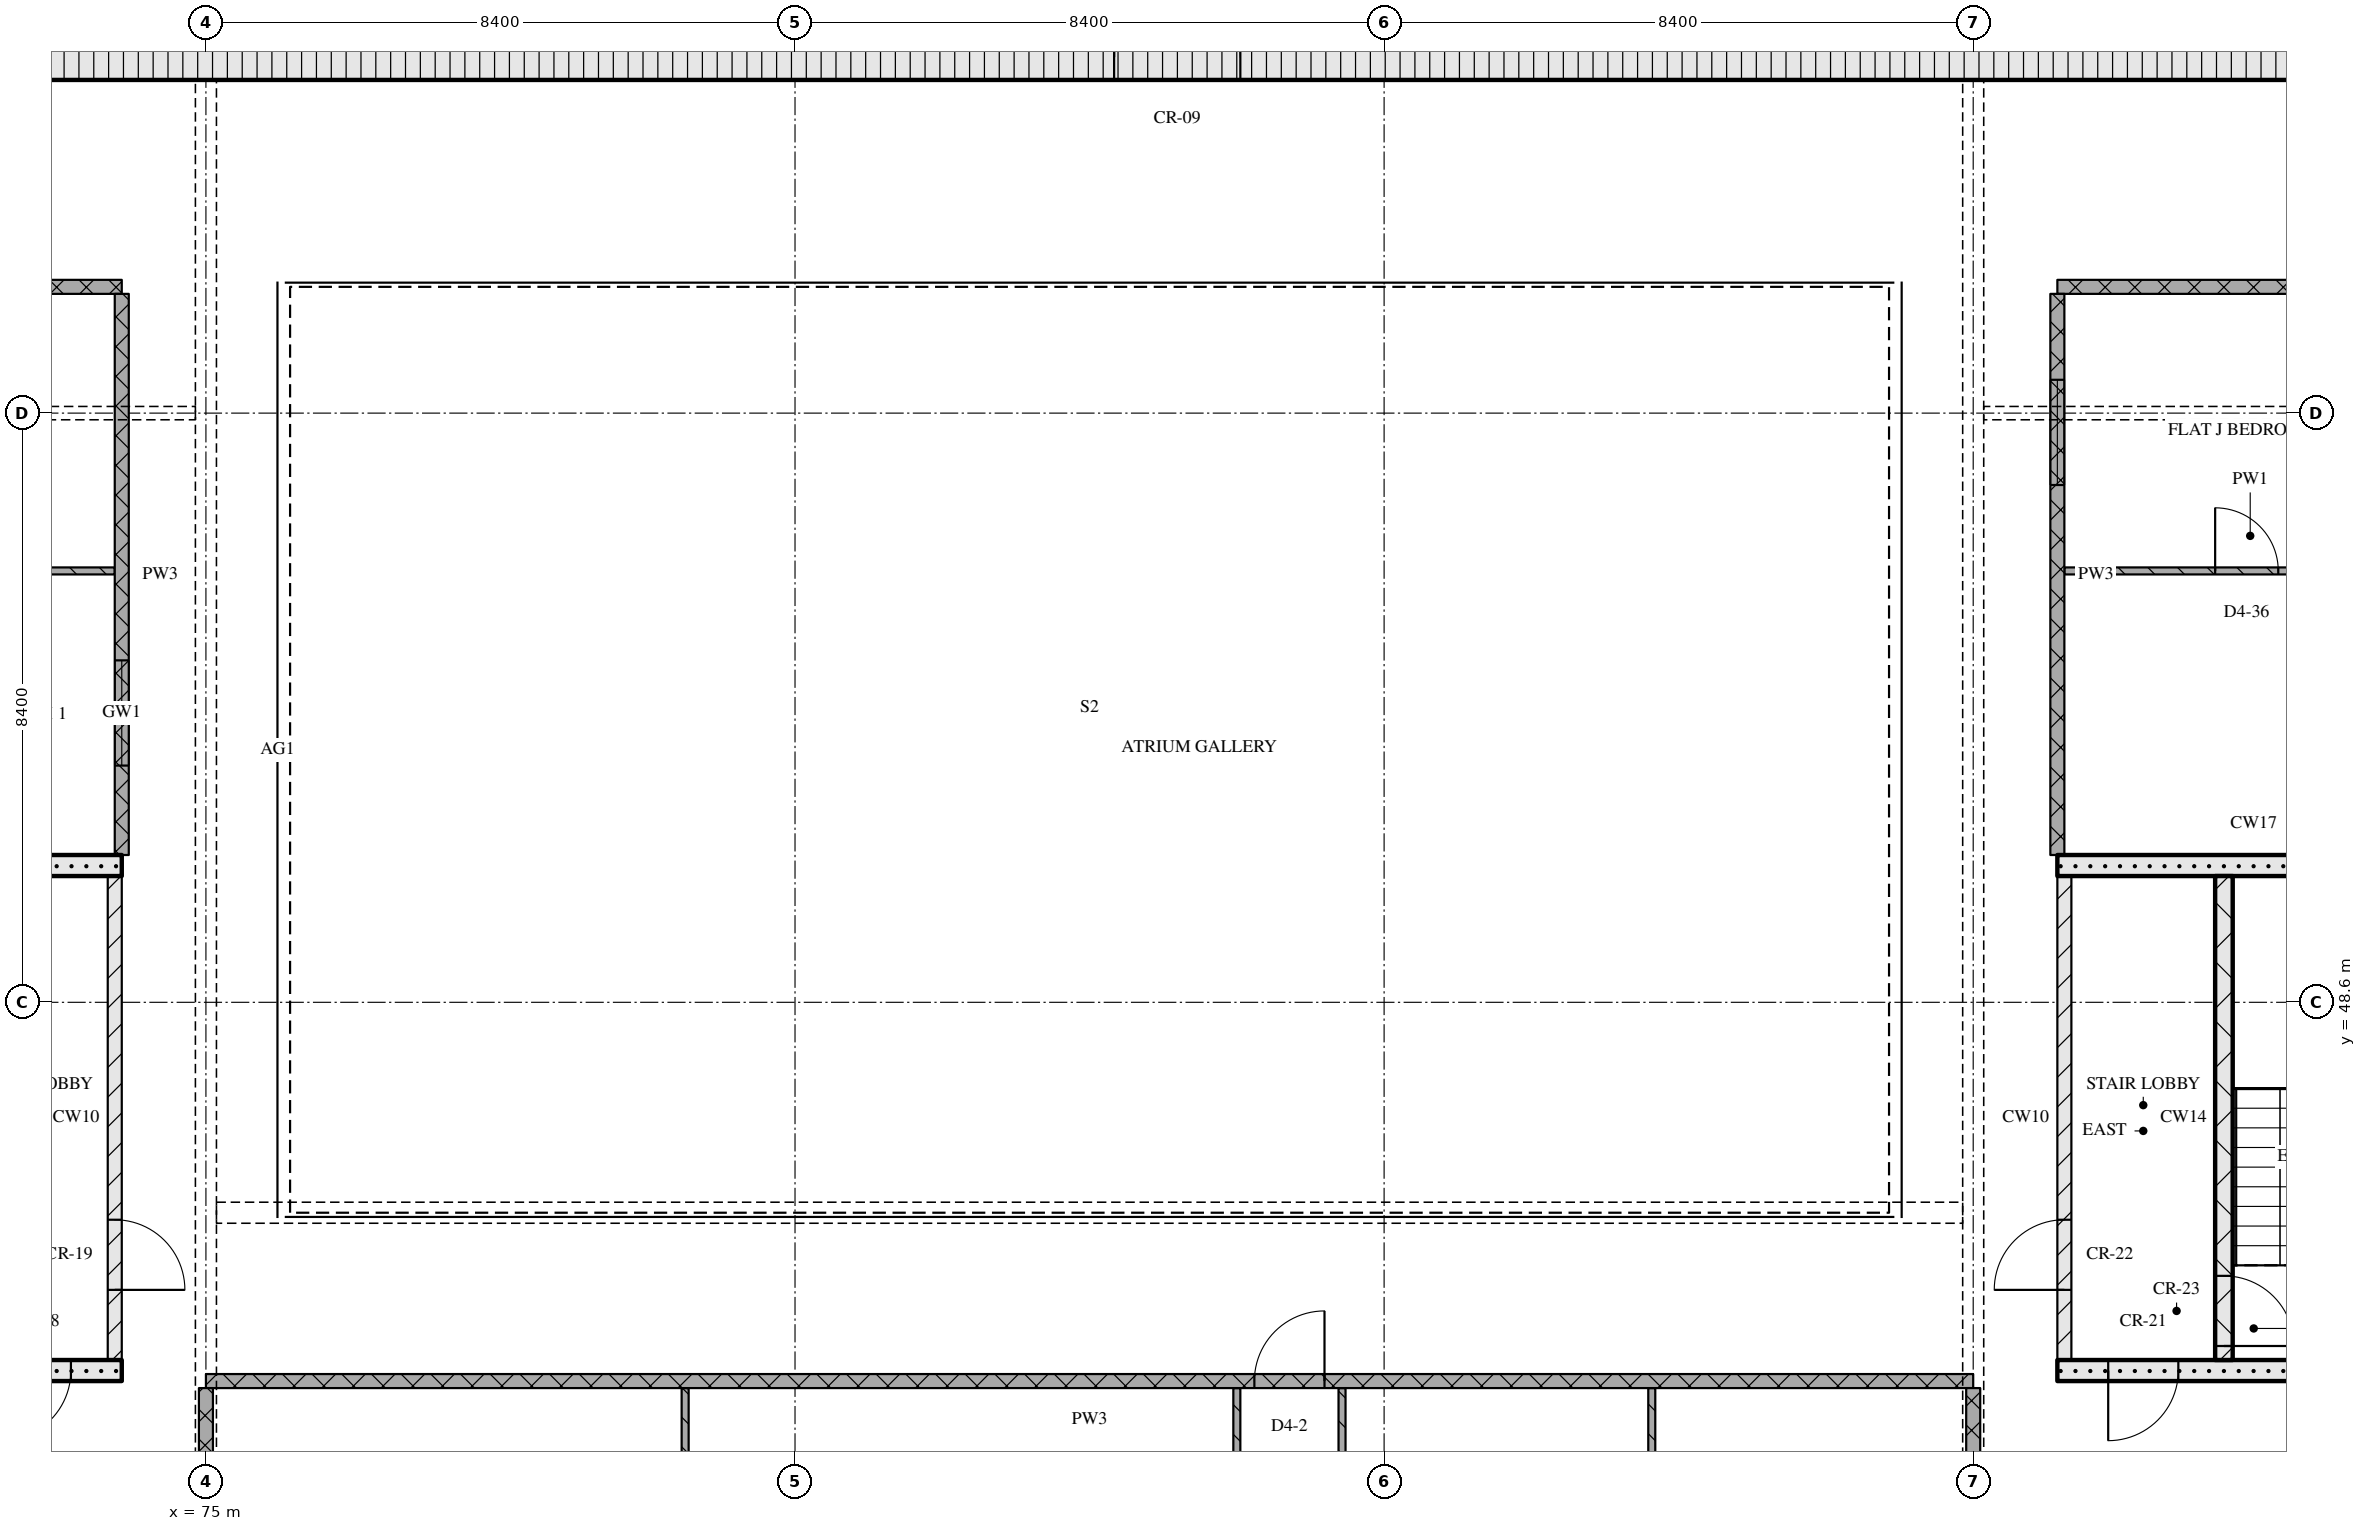
"""IFC4 building model, lengths in metres.
Left out: names, types, materials, properties, quantities, classifications, styles, units other than length and angle.
Written with IfcOpenShell. Run it as: python <this file> out.ifc"""

import sys

from ifc_helpers import new_model, si_unit, direction, frame, frame_2d, origin, place, context, subcontext, project, spatial, rectangle, extrude, element, fill, save


model = new_model("IFC4")
c1 = context("Model", 3, precision=1e-05, world=origin(), true_north=direction((0.0, 1.0)))
c2 = subcontext(c1, "Body", "Model", "MODEL_VIEW")
j1 = project(units=[si_unit("LENGTHUNIT", "METRE"), si_unit("PLANEANGLEUNIT", "RADIAN")], contexts=[c1])
p1 = place(None, origin())
s1 = spatial("IfcSite", under=j1, at=p1, CompositionType="ELEMENT")
p2 = place(p1, origin())
s2 = spatial("IfcBuilding", under=s1, at=p2, CompositionType="ELEMENT")
p3 = place(p2, frame((0.0, 0.0, 237.9)))
s3 = spatial("IfcBuildingStorey", under=s2, at=p3, CompositionType="ELEMENT", Elevation=237.9)
p4 = place(p3, frame((67.15, 62.075, 0.0), z_axis=(0.0, 0.0, 1.0), x_axis=(1.0, 0.0, 0.0)))
e1 = element("IfcWall", 1, at=p4, inside=s3, PredefinedType="SOLIDWALL", context=c2, shape_type="SweptSolid", body=[
    extrude(rectangle(XDim=40.9, YDim=0.65, at=frame_2d((20.45, 0.0))), origin(), (0.0, 0.0, 1.0), 3.32),
])
p5 = place(p4, frame((20.8, 0.0, 0.0)))
e2 = element("IfcOpeningElement", 2, at=p5, cuts=e1, PredefinedType="OPENING", context=c2, shape_type="SweptSolid", body=[
    extrude(rectangle(XDim=1.8, YDim=2.1, at=frame_2d((0.9, 1.05))), frame((0.0, 0.335, 0.0), z_axis=(0.0, -1.0, 0.0), x_axis=(1.0, 0.0, 0.0)), (0.0, 0.0, 1.0), 0.67),
])
p6 = place(p3, frame((68.2, 43.35, 0.0), z_axis=(0.0, 0.0, 1.0), x_axis=(1.0, 0.0, 0.0)))
e3 = element("IfcWall", 3, at=p6, inside=s3, PredefinedType="SOLIDWALL", context=c2, shape_type="SweptSolid", body=[
    extrude(rectangle(XDim=5.6, YDim=0.3, at=frame_2d((2.8, 0.0))), origin(), (0.0, 0.0, 1.0), 3.32),
])
p7 = place(p6, frame((3.875, 0.0, 0.0)))
e4 = element("IfcOpeningElement", 4, at=p7, cuts=e3, PredefinedType="OPENING", context=c2, shape_type="SweptSolid", body=[
    extrude(rectangle(XDim=1.0, YDim=2.1, at=frame_2d((0.5, 1.05))), frame((0.0, 0.16, 0.0), z_axis=(0.0, -1.0, 0.0), x_axis=(1.0, 0.0, 0.0)), (0.0, 0.0, 1.0), 0.32),
])
p8 = place(p3, frame((73.7, 43.5, 0.0), z_axis=(0.0, 0.0, 1.0), x_axis=(0.0, 1.0, 0.0)))
e5 = element("IfcWall", 5, at=p8, inside=s3, PredefinedType="PARTITIONING", context=c2, shape_type="SweptSolid", body=[
    extrude(rectangle(XDim=6.9, YDim=0.2, at=frame_2d((3.45, 0.0))), origin(), (0.0, 0.0, 1.0), 3.32),
])
p9 = place(p8, frame((1.0, 0.0, 0.0)))
e6 = element("IfcOpeningElement", 6, at=p9, cuts=e5, PredefinedType="OPENING", context=c2, shape_type="SweptSolid", body=[
    extrude(rectangle(XDim=1.0, YDim=2.1, at=frame_2d((0.5, 1.05))), frame((0.0, 0.11, 0.0), z_axis=(0.0, -1.0, 0.0), x_axis=(1.0, 0.0, 0.0)), (0.0, 0.0, 1.0), 0.22),
])
p10 = place(p3, frame((68.2, 50.55, 0.0), z_axis=(0.0, 0.0, 1.0), x_axis=(1.0, 0.0, 0.0)))
e7 = element("IfcWall", 7, at=p10, inside=s3, PredefinedType="SOLIDWALL", context=c2, shape_type="SweptSolid", body=[
    extrude(rectangle(XDim=5.6, YDim=0.3, at=frame_2d((2.8, 0.0))), origin(), (0.0, 0.0, 1.0), 3.32),
])
p11 = place(p3, frame((101.4, 43.35, 0.0), z_axis=(0.0, 0.0, 1.0), x_axis=(1.0, 0.0, 0.0)))
e8 = element("IfcWall", 8, at=p11, inside=s3, PredefinedType="SOLIDWALL", context=c2, shape_type="SweptSolid", body=[
    extrude(rectangle(XDim=5.6, YDim=0.3, at=frame_2d((2.8, 0.0))), origin(), (0.0, 0.0, 1.0), 3.32),
])
p12 = place(p11, frame((0.725, 0.0, 0.0)))
e9 = element("IfcOpeningElement", 9, at=p12, cuts=e8, PredefinedType="OPENING", context=c2, shape_type="SweptSolid", body=[
    extrude(rectangle(XDim=1.0, YDim=2.1, at=frame_2d((0.5, 1.05))), frame((0.0, 0.16, 0.0), z_axis=(0.0, -1.0, 0.0), x_axis=(1.0, 0.0, 0.0)), (0.0, 0.0, 1.0), 0.32),
])
p13 = place(p3, frame((101.5, 43.5, 0.0), z_axis=(0.0, 0.0, 1.0), x_axis=(0.0, 1.0, 0.0)))
e10 = element("IfcWall", 10, at=p13, inside=s3, PredefinedType="PARTITIONING", context=c2, shape_type="SweptSolid", body=[
    extrude(rectangle(XDim=6.9, YDim=0.2, at=frame_2d((3.45, 0.0))), origin(), (0.0, 0.0, 1.0), 3.32),
])
p14 = place(p13, frame((1.0, 0.0, 0.0)))
e11 = element("IfcOpeningElement", 11, at=p14, cuts=e10, PredefinedType="OPENING", context=c2, shape_type="SweptSolid", body=[
    extrude(rectangle(XDim=1.0, YDim=2.1, at=frame_2d((0.5, 1.05))), frame((0.0, 0.11, 0.0), z_axis=(0.0, -1.0, 0.0), x_axis=(1.0, 0.0, 0.0)), (0.0, 0.0, 1.0), 0.22),
])
p15 = place(p3, frame((103.775, 43.5, 0.0), z_axis=(0.0, 0.0, 1.0), x_axis=(0.0, 1.0, 0.0)))
e12 = element("IfcWall", 12, at=p15, inside=s3, PredefinedType="SOLIDWALL", context=c2, shape_type="SweptSolid", body=[
    extrude(rectangle(XDim=6.9, YDim=0.25, at=frame_2d((3.45, 0.0))), origin(), (0.0, 0.0, 1.0), 3.32),
])
p16 = place(p15, frame((0.2, 0.0, 0.0)))
e13 = element("IfcOpeningElement", 13, at=p16, cuts=e12, PredefinedType="OPENING", context=c2, shape_type="SweptSolid", body=[
    extrude(rectangle(XDim=1.0, YDim=2.1, at=frame_2d((0.5, 1.05))), frame((0.0, 0.135, 0.0), z_axis=(0.0, -1.0, 0.0), x_axis=(1.0, 0.0, 0.0)), (0.0, 0.0, 1.0), 0.27),
])
p17 = place(p3, frame((101.4, 50.55, 0.0), z_axis=(0.0, 0.0, 1.0), x_axis=(1.0, 0.0, 0.0)))
e14 = element("IfcWall", 14, at=p17, inside=s3, PredefinedType="SOLIDWALL", context=c2, shape_type="SweptSolid", body=[
    extrude(rectangle(XDim=5.6, YDim=0.3, at=frame_2d((2.8, 0.0))), origin(), (0.0, 0.0, 1.0), 3.32),
])
p18 = place(p3, frame((100.2, 43.2, 0.0), z_axis=(0.0, 0.0, 1.0), x_axis=(-1.0, 0.0, 0.0)))
e15 = element("IfcWall", 15, at=p18, inside=s3, PredefinedType="PARTITIONING", context=c2, shape_type="SweptSolid", body=[
    extrude(rectangle(XDim=25.2, YDim=0.2, at=frame_2d((12.6, 0.0))), origin(), (0.0, 0.0, 1.0), 3.32),
])
p19 = place(p18, frame((9.25, 0.0, 0.0)))
e16 = element("IfcOpeningElement", 16, at=p19, cuts=e15, PredefinedType="OPENING", context=c2, shape_type="SweptSolid", body=[
    extrude(rectangle(XDim=1.0, YDim=2.1, at=frame_2d((0.5, 1.05))), frame((0.0, 0.11, 0.0), z_axis=(0.0, -1.0, 0.0), x_axis=(1.0, 0.0, 0.0)), (0.0, 0.0, 1.0), 0.22),
])
p20 = place(p3, frame((73.7, 54.75, 0.0), z_axis=(0.0, 0.0, 1.0), x_axis=(-1.0, 0.0, 0.0)))
e17 = element("IfcWall", 17, at=p20, inside=s3, PredefinedType="PARTITIONING", context=c2, shape_type="SweptSolid", body=[
    extrude(rectangle(XDim=4.4, YDim=0.1, at=frame_2d((2.2, 0.0))), origin(), (0.0, 0.0, 1.0), 3.32),
])
p21 = place(p20, frame((1.7, 0.0, 0.0)))
e18 = element("IfcOpeningElement", 18, at=p21, cuts=e17, PredefinedType="OPENING", context=c2, shape_type="SweptSolid", body=[
    extrude(rectangle(XDim=0.9, YDim=2.1, at=frame_2d((0.45, 1.05))), frame((0.0, 0.06, 0.0), z_axis=(0.0, -1.0, 0.0), x_axis=(1.0, 0.0, 0.0)), (0.0, 0.0, 1.0), 0.12),
])
p22 = place(p3, frame((101.5, 54.75, 0.0), z_axis=(0.0, 0.0, 1.0), x_axis=(1.0, 0.0, 0.0)))
e19 = element("IfcWall", 19, at=p22, inside=s3, PredefinedType="PARTITIONING", context=c2, shape_type="SweptSolid", body=[
    extrude(rectangle(XDim=5.3, YDim=0.1, at=frame_2d((2.65, 0.0))), origin(), (0.0, 0.0, 1.0), 3.32),
])
p23 = place(p22, frame((2.15, 0.0, 0.0)))
e20 = element("IfcOpeningElement", 20, at=p23, cuts=e19, PredefinedType="OPENING", context=c2, shape_type="SweptSolid", body=[
    extrude(rectangle(XDim=0.9, YDim=2.1, at=frame_2d((0.45, 1.05))), frame((0.0, 0.06, 0.0), z_axis=(0.0, -1.0, 0.0), x_axis=(1.0, 0.0, 0.0)), (0.0, 0.0, 1.0), 0.12),
])
for number, where, z_axis, x_axis in (
    (21, (63.0, 58.8, 0.0), (0.0, 0.0, 1.0), (1.0, 0.0, 0.0)),
    (22, (101.4, 58.8, 0.0), (0.0, 0.0, 1.0), (1.0, 0.0, 0.0)),
):
    element("IfcWall", number, at=place(p3, frame(where, z_axis=z_axis, x_axis=x_axis)), inside=s3, PredefinedType="PARTITIONING", context=c2, shape_type="SweptSolid", body=[
        extrude(rectangle(XDim=10.8, YDim=0.2, at=frame_2d((5.4, 0.0))), origin(), (0.0, 0.0, 1.0), 3.32),
    ])
p24 = place(p3, frame((73.8, 58.7, 0.0), z_axis=(0.0, 0.0, 1.0), x_axis=(0.0, -1.0, 0.0)))
e23 = element("IfcWall", 23, at=p24, inside=s3, PredefinedType="PARTITIONING", context=c2, shape_type="SweptSolid", body=[
    extrude(rectangle(XDim=8.0, YDim=0.2, at=frame_2d((4.0, 0.0))), origin(), (0.0, 0.0, 1.0), 3.32),
])
p25 = place(p24, frame((5.225, 0.0, 0.9)))
e24 = element("IfcOpeningElement", 24, at=p25, cuts=e23, PredefinedType="OPENING", context=c2, shape_type="SweptSolid", body=[
    extrude(rectangle(XDim=1.5, YDim=1.5, at=frame_2d((0.75, 0.75))), frame((0.0, 0.11, 0.0), z_axis=(0.0, -1.0, 0.0), x_axis=(1.0, 0.0, 0.0)), (0.0, 0.0, 1.0), 0.22),
])
p26 = place(p3, frame((75.0, 43.1, 0.0), z_axis=(0.0, 0.0, 1.0), x_axis=(0.0, -1.0, 0.0)))
e25 = element("IfcWall", 25, at=p26, inside=s3, PredefinedType="PARTITIONING", context=c2, shape_type="SweptSolid", body=[
    extrude(rectangle(XDim=2.2, YDim=0.2, at=frame_2d((1.1, 0.0))), origin(), (0.0, 0.0, 1.0), 2.53),
])
for number, where, z_axis, x_axis in (
    (26, (81.833, 43.1, 0.0), (0.0, 0.0, 1.0), (0.0, -1.0, 0.0)),
    (27, (89.7, 43.1, 0.0), (0.0, 0.0, 1.0), (0.0, -1.0, 0.0)),
):
    element("IfcWall", number, at=place(p3, frame(where, z_axis=z_axis, x_axis=x_axis)), inside=s3, PredefinedType="PARTITIONING", context=c2, shape_type="SweptSolid", body=[
        extrude(rectangle(XDim=5.85, YDim=0.1, at=frame_2d((2.925, 0.0))), origin(), (0.0, 0.0, 1.0), 3.32),
    ])
p27 = place(p3, frame((91.2, 43.1, 0.0), z_axis=(0.0, 0.0, 1.0), x_axis=(0.0, -1.0, 0.0)))
e28 = element("IfcWall", 28, at=p27, inside=s3, PredefinedType="PARTITIONING", context=c2, shape_type="SweptSolid", body=[
    extrude(rectangle(XDim=5.85, YDim=0.1, at=frame_2d((2.925, 0.0))), origin(), (0.0, 0.0, 1.0), 3.32),
])
p28 = place(p27, frame((1.75, 0.0, 0.0)))
e29 = element("IfcOpeningElement", 29, at=p28, cuts=e28, PredefinedType="OPENING", context=c2, shape_type="SweptSolid", body=[
    extrude(rectangle(XDim=0.8, YDim=2.1, at=frame_2d((0.4, 1.05))), frame((0.0, 0.06, 0.0), z_axis=(0.0, -1.0, 0.0), x_axis=(1.0, 0.0, 0.0)), (0.0, 0.0, 1.0), 0.12),
])
p29 = place(p3, frame((95.617, 43.1, 0.0), z_axis=(0.0, 0.0, 1.0), x_axis=(0.0, -1.0, 0.0)))
e30 = element("IfcWall", 30, at=p29, inside=s3, PredefinedType="PARTITIONING", context=c2, shape_type="SweptSolid", body=[
    extrude(rectangle(XDim=5.85, YDim=0.1, at=frame_2d((2.925, 0.0))), origin(), (0.0, 0.0, 1.0), 3.32),
])
p30 = place(p3, frame((100.2, 43.1, 0.0), z_axis=(0.0, 0.0, 1.0), x_axis=(0.0, -1.0, 0.0)))
e31 = element("IfcWall", 31, at=p30, inside=s3, PredefinedType="PARTITIONING", context=c2, shape_type="SweptSolid", body=[
    extrude(rectangle(XDim=2.2, YDim=0.2, at=frame_2d((1.1, 0.0))), origin(), (0.0, 0.0, 1.0), 2.53),
])
p31 = place(p3, frame((101.4, 58.7, 0.0), z_axis=(0.0, 0.0, 1.0), x_axis=(0.0, -1.0, 0.0)))
e32 = element("IfcWall", 32, at=p31, inside=s3, PredefinedType="PARTITIONING", context=c2, shape_type="SweptSolid", body=[
    extrude(rectangle(XDim=8.0, YDim=0.2, at=frame_2d((4.0, 0.0))), origin(), (0.0, 0.0, 1.0), 3.32),
])
p32 = place(p31, frame((1.225, 0.0, 0.9)))
e33 = element("IfcOpeningElement", 33, at=p32, cuts=e32, PredefinedType="OPENING", context=c2, shape_type="SweptSolid", body=[
    extrude(rectangle(XDim=1.5, YDim=1.5, at=frame_2d((0.75, 0.75))), frame((0.0, 0.11, 0.0), z_axis=(0.0, -1.0, 0.0), x_axis=(1.0, 0.0, 0.0)), (0.0, 0.0, 1.0), 0.22),
])
p33 = place(p5, origin())
e34 = element("IfcDoor", 34, at=p33, inside=s3, OperationType="DOUBLE_DOOR_SINGLE_SWING", PredefinedType="DOOR", context=c2, shape_type="SweptSolid", body=[
    extrude(rectangle(XDim=1.8, YDim=2.1, at=frame_2d((0.9, 1.05))), frame((0.0, 0.025, 0.0), z_axis=(0.0, -1.0, 0.0), x_axis=(1.0, 0.0, 0.0)), (0.0, 0.0, 1.0), 0.05),
])
fill(e2, e34)
p34 = place(p7, origin())
e35 = element("IfcDoor", 35, at=p34, inside=s3, OperationType="SINGLE_SWING_RIGHT", PredefinedType="DOOR", context=c2, shape_type="SweptSolid", body=[
    extrude(rectangle(XDim=1.0, YDim=2.1, at=frame_2d((0.5, 1.05))), frame((0.0, 0.025, 0.0), z_axis=(0.0, -1.0, 0.0), x_axis=(1.0, 0.0, 0.0)), (0.0, 0.0, 1.0), 0.05),
])
fill(e4, e35)
p35 = place(p9, origin())
e36 = element("IfcDoor", 36, at=p35, inside=s3, OperationType="SINGLE_SWING_RIGHT", PredefinedType="DOOR", context=c2, shape_type="SweptSolid", body=[
    extrude(rectangle(XDim=1.0, YDim=2.1, at=frame_2d((0.5, 1.05))), frame((0.0, 0.025, 0.0), z_axis=(0.0, -1.0, 0.0), x_axis=(1.0, 0.0, 0.0)), (0.0, 0.0, 1.0), 0.05),
])
fill(e6, e36)
p36 = place(p12, origin())
e37 = element("IfcDoor", 37, at=p36, inside=s3, OperationType="SINGLE_SWING_RIGHT", PredefinedType="DOOR", context=c2, shape_type="SweptSolid", body=[
    extrude(rectangle(XDim=1.0, YDim=2.1, at=frame_2d((0.5, 1.05))), frame((0.0, 0.025, 0.0), z_axis=(0.0, -1.0, 0.0), x_axis=(1.0, 0.0, 0.0)), (0.0, 0.0, 1.0), 0.05),
])
fill(e9, e37)
p37 = place(p16, origin())
e38 = element("IfcDoor", 38, at=p37, inside=s3, OperationType="SINGLE_SWING_RIGHT", PredefinedType="DOOR", context=c2, shape_type="SweptSolid", body=[
    extrude(rectangle(XDim=1.0, YDim=2.1, at=frame_2d((0.5, 1.05))), frame((0.0, 0.025, 0.0), z_axis=(0.0, -1.0, 0.0), x_axis=(1.0, 0.0, 0.0)), (0.0, 0.0, 1.0), 0.05),
])
fill(e13, e38)
p38 = place(p14, origin())
e39 = element("IfcDoor", 39, at=p38, inside=s3, OperationType="SINGLE_SWING_LEFT", PredefinedType="DOOR", context=c2, shape_type="SweptSolid", body=[
    extrude(rectangle(XDim=1.0, YDim=2.1, at=frame_2d((0.5, 1.05))), frame((0.0, 0.025, 0.0), z_axis=(0.0, -1.0, 0.0), x_axis=(1.0, 0.0, 0.0)), (0.0, 0.0, 1.0), 0.05),
])
fill(e11, e39)
p39 = place(p19, origin())
e40 = element("IfcDoor", 40, at=p39, inside=s3, OperationType="SINGLE_SWING_RIGHT", PredefinedType="DOOR", context=c2, shape_type="SweptSolid", body=[
    extrude(rectangle(XDim=1.0, YDim=2.1, at=frame_2d((0.5, 1.05))), frame((0.0, 0.025, 0.0), z_axis=(0.0, -1.0, 0.0), x_axis=(1.0, 0.0, 0.0)), (0.0, 0.0, 1.0), 0.05),
])
fill(e16, e40)
p40 = place(p23, origin())
e41 = element("IfcDoor", 41, at=p40, inside=s3, OperationType="SINGLE_SWING_LEFT", PredefinedType="DOOR", context=c2, shape_type="SweptSolid", body=[
    extrude(rectangle(XDim=0.9, YDim=2.1, at=frame_2d((0.45, 1.05))), frame((0.0, 0.025, 0.0), z_axis=(0.0, -1.0, 0.0), x_axis=(1.0, 0.0, 0.0)), (0.0, 0.0, 1.0), 0.05),
])
fill(e20, e41)
p41 = place(p25, origin())
e42 = element("IfcWindow", 42, at=p41, inside=s3, PartitioningType="SINGLE_PANEL", PredefinedType="WINDOW", context=c2, shape_type="SweptSolid", body=[
    extrude(rectangle(XDim=1.5, YDim=1.5, at=frame_2d((0.75, 0.75))), frame((0.0, 0.03, 0.0), z_axis=(0.0, -1.0, 0.0), x_axis=(1.0, 0.0, 0.0)), (0.0, 0.0, 1.0), 0.06),
])
fill(e24, e42)
p42 = place(p32, origin())
e43 = element("IfcWindow", 43, at=p42, inside=s3, PartitioningType="SINGLE_PANEL", PredefinedType="WINDOW", context=c2, shape_type="SweptSolid", body=[
    extrude(rectangle(XDim=1.5, YDim=1.5, at=frame_2d((0.75, 0.75))), frame((0.0, 0.03, 0.0), z_axis=(0.0, -1.0, 0.0), x_axis=(1.0, 0.0, 0.0)), (0.0, 0.0, 1.0), 0.06),
])
fill(e33, e43)
save(model, sys.argv[1])
